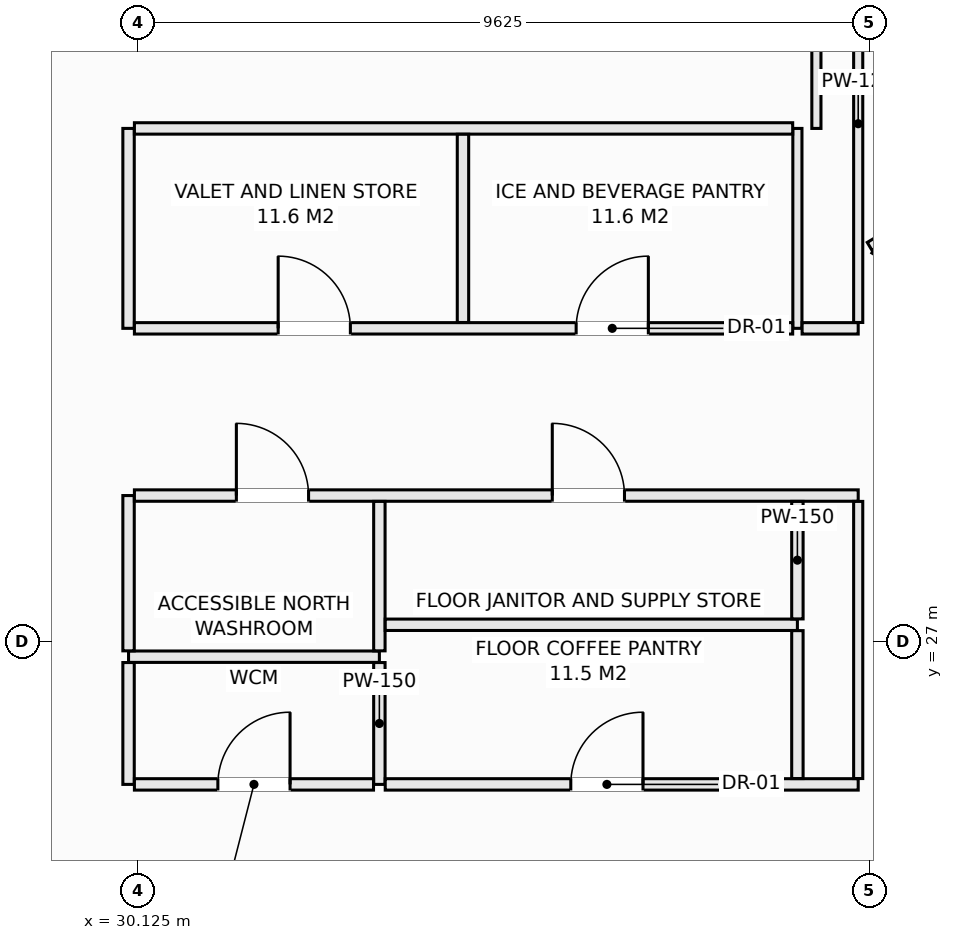
"""IFC4 building model, lengths in metres.
Left out: names, types, materials, properties, quantities, classifications, styles, units other than length and angle.
Written with IfcOpenShell. Run it as: python <this file> out.ifc"""

import sys

from ifc_helpers import new_model, si_unit, direction, frame, frame_2d, origin, place, context, subcontext, project, spatial, rectangle, extrude, element, fill, save


model = new_model("IFC4")
c1 = context("Model", 3, precision=1e-05, world=origin(), true_north=direction((0.0, 1.0)))
c2 = subcontext(c1, "Body", "Model", "MODEL_VIEW")
j1 = project(units=[si_unit("LENGTHUNIT", "METRE"), si_unit("PLANEANGLEUNIT", "RADIAN")], contexts=[c1])
p1 = place(None, origin())
s1 = spatial("IfcSite", under=j1, at=p1, CompositionType="ELEMENT")
p2 = place(p1, origin())
s2 = spatial("IfcBuilding", under=s1, at=p2, CompositionType="ELEMENT")
p3 = place(p2, frame((0.0, 0.0, 259.1)))
s3 = spatial("IfcBuildingStorey", under=s2, at=p3, CompositionType="ELEMENT", Elevation=259.1)
p4 = place(p3, frame((30.0, 26.8, 0.0), z_axis=(0.0, 0.0, 1.0), x_axis=(1.0, 0.0, 0.0)))
e1 = element("IfcWall", 1, at=p4, inside=s3, PredefinedType="PARTITIONING", context=c2, shape_type="SweptSolid", body=[
    extrude(rectangle(XDim=3.3, YDim=0.15, at=frame_2d((1.65, 0.0))), origin(), (0.0, 0.0, 1.0), 3.03),
])
p5 = place(p3, frame((30.0, 25.12, 0.0), z_axis=(0.0, 0.0, 1.0), x_axis=(0.0, 1.0, 0.0)))
e2 = element("IfcWall", 2, at=p5, inside=s3, PredefinedType="PARTITIONING", context=c2, shape_type="SweptSolid", body=[
    extrude(rectangle(XDim=1.603, YDim=0.15, at=frame_2d((0.801, 0.0))), origin(), (0.0, 0.0, 1.0), 3.03),
])
p6 = place(p3, frame((30.0, 26.877, 0.0), z_axis=(0.0, 0.0, 1.0), x_axis=(0.0, 1.0, 0.0)))
e3 = element("IfcWall", 3, at=p6, inside=s3, PredefinedType="PARTITIONING", context=c2, shape_type="SweptSolid", body=[
    extrude(rectangle(XDim=2.043, YDim=0.15, at=frame_2d((1.021, 0.0))), origin(), (0.0, 0.0, 1.0), 3.03),
])
p7 = place(p3, frame((30.0, 31.12, 0.0), z_axis=(0.0, 0.0, 1.0), x_axis=(0.0, 1.0, 0.0)))
e4 = element("IfcWall", 4, at=p7, inside=s3, PredefinedType="PARTITIONING", context=c2, shape_type="SweptSolid", body=[
    extrude(rectangle(XDim=2.63, YDim=0.15, at=frame_2d((1.315, 0.0))), origin(), (0.0, 0.0, 1.0), 3.03),
])
p8 = place(p3, frame((30.077, 28.92, 0.0), z_axis=(0.0, 0.0, 1.0), x_axis=(1.0, 0.0, 0.0)))
e5 = element("IfcWall", 5, at=p8, inside=s3, PredefinedType="PARTITIONING", context=c2, shape_type="SweptSolid", body=[
    extrude(rectangle(XDim=9.523, YDim=0.15, at=frame_2d((4.762, 0.0))), origin(), (0.0, 0.0, 1.0), 3.03),
])
p9 = place(p8, frame((1.342, 0.0, 0.0)))
e6 = element("IfcOpeningElement", 6, at=p9, cuts=e5, PredefinedType="OPENING", context=c2, shape_type="SweptSolid", body=[
    extrude(rectangle(XDim=0.95, YDim=2.1, at=frame_2d((0.475, 1.05))), frame((0.0, 0.085, 0.0), z_axis=(0.0, -1.0, 0.0), x_axis=(1.0, 0.0, 0.0)), (0.0, 0.0, 1.0), 0.17),
])
p10 = place(p8, frame((5.498, 0.0, 0.0)))
e7 = element("IfcOpeningElement", 7, at=p10, cuts=e5, PredefinedType="OPENING", context=c2, shape_type="SweptSolid", body=[
    extrude(rectangle(XDim=0.95, YDim=2.1, at=frame_2d((0.475, 1.05))), frame((0.0, 0.085, 0.0), z_axis=(0.0, -1.0, 0.0), x_axis=(1.0, 0.0, 0.0)), (0.0, 0.0, 1.0), 0.17),
])
p11 = place(p3, frame((33.3, 25.12, 0.0), z_axis=(0.0, 0.0, 1.0), x_axis=(0.0, 1.0, 0.0)))
e8 = element("IfcWall", 8, at=p11, inside=s3, PredefinedType="PARTITIONING", context=c2, shape_type="SweptSolid", body=[
    extrude(rectangle(XDim=1.603, YDim=0.15, at=frame_2d((0.801, 0.0))), origin(), (0.0, 0.0, 1.0), 3.03),
])
p12 = place(p3, frame((33.3, 26.877, 0.0), z_axis=(0.0, 0.0, 1.0), x_axis=(0.0, 1.0, 0.0)))
e9 = element("IfcWall", 9, at=p12, inside=s3, PredefinedType="PARTITIONING", context=c2, shape_type="SweptSolid", body=[
    extrude(rectangle(XDim=1.966, YDim=0.15, at=frame_2d((0.983, 0.0))), origin(), (0.0, 0.0, 1.0), 3.03),
])
p13 = place(p3, frame((30.077, 25.12, 0.0), z_axis=(0.0, 0.0, 1.0), x_axis=(1.0, 0.0, 0.0)))
e10 = element("IfcWall", 10, at=p13, inside=s3, PredefinedType="PARTITIONING", context=c2, shape_type="SweptSolid", body=[
    extrude(rectangle(XDim=3.146, YDim=0.15, at=frame_2d((1.573, 0.0))), origin(), (0.0, 0.0, 1.0), 3.03),
])
p14 = place(p13, frame((1.098, 0.0, 0.0)))
e11 = element("IfcOpeningElement", 11, at=p14, cuts=e10, PredefinedType="OPENING", context=c2, shape_type="SweptSolid", body=[
    extrude(rectangle(XDim=0.95, YDim=2.1, at=frame_2d((0.475, 1.05))), frame((0.0, 0.085, 0.0), z_axis=(0.0, -1.0, 0.0), x_axis=(1.0, 0.0, 0.0)), (0.0, 0.0, 1.0), 0.17),
])
p15 = place(p3, frame((33.377, 25.12, 0.0), z_axis=(0.0, 0.0, 1.0), x_axis=(1.0, 0.0, 0.0)))
e12 = element("IfcWall", 12, at=p15, inside=s3, PredefinedType="PARTITIONING", context=c2, shape_type="SweptSolid", body=[
    extrude(rectangle(XDim=6.223, YDim=0.15, at=frame_2d((3.112, 0.0))), origin(), (0.0, 0.0, 1.0), 3.03),
])
p16 = place(p15, frame((2.441, 0.0, 0.0)))
e13 = element("IfcOpeningElement", 13, at=p16, cuts=e12, PredefinedType="OPENING", context=c2, shape_type="SweptSolid", body=[
    extrude(rectangle(XDim=0.95, YDim=2.1, at=frame_2d((0.475, 1.05))), frame((0.0, 0.085, 0.0), z_axis=(0.0, -1.0, 0.0), x_axis=(1.0, 0.0, 0.0)), (0.0, 0.0, 1.0), 0.17),
])
p17 = place(p3, frame((33.377, 27.22, 0.0), z_axis=(0.0, 0.0, 1.0), x_axis=(1.0, 0.0, 0.0)))
e14 = element("IfcWall", 14, at=p17, inside=s3, PredefinedType="PARTITIONING", context=c2, shape_type="SweptSolid", body=[
    extrude(rectangle(XDim=5.423, YDim=0.15, at=frame_2d((2.711, 0.0))), origin(), (0.0, 0.0, 1.0), 3.03),
])
p18 = place(p3, frame((38.8, 25.197, 0.0), z_axis=(0.0, 0.0, 1.0), x_axis=(0.0, 1.0, 0.0)))
e15 = element("IfcWall", 15, at=p18, inside=s3, PredefinedType="PARTITIONING", context=c2, shape_type="SweptSolid", body=[
    extrude(rectangle(XDim=1.946, YDim=0.15, at=frame_2d((0.973, 0.0))), origin(), (0.0, 0.0, 1.0), 3.03),
])
p19 = place(p3, frame((38.8, 27.297, 0.0), z_axis=(0.0, 0.0, 1.0), x_axis=(0.0, 1.0, 0.0)))
e16 = element("IfcWall", 16, at=p19, inside=s3, PredefinedType="PARTITIONING", context=c2, shape_type="SweptSolid", body=[
    extrude(rectangle(XDim=1.546, YDim=0.15, at=frame_2d((0.773, 0.0))), origin(), (0.0, 0.0, 1.0), 3.03),
])
p20 = place(p3, frame((38.8, 31.12, 0.0), z_axis=(0.0, 0.0, 1.0), x_axis=(0.0, 1.0, 0.0)))
e17 = element("IfcWall", 17, at=p20, inside=s3, PredefinedType="PARTITIONING", context=c2, shape_type="SweptSolid", body=[
    extrude(rectangle(XDim=2.63, YDim=0.12, at=frame_2d((1.315, 0.0))), origin(), (0.0, 0.0, 1.0), 3.03),
])
p21 = place(p3, frame((30.077, 31.12, 0.0), z_axis=(0.0, 0.0, 1.0), x_axis=(1.0, 0.0, 0.0)))
e18 = element("IfcWall", 18, at=p21, inside=s3, PredefinedType="PARTITIONING", context=c2, shape_type="SweptSolid", body=[
    extrude(rectangle(XDim=8.661, YDim=0.15, at=frame_2d((4.331, 0.0))), origin(), (0.0, 0.0, 1.0), 3.03),
])
p22 = place(p21, frame((1.892, 0.0, 0.0)))
e19 = element("IfcOpeningElement", 19, at=p22, cuts=e18, PredefinedType="OPENING", context=c2, shape_type="SweptSolid", body=[
    extrude(rectangle(XDim=0.95, YDim=2.1, at=frame_2d((0.475, 1.05))), frame((0.0, 0.085, 0.0), z_axis=(0.0, -1.0, 0.0), x_axis=(1.0, 0.0, 0.0)), (0.0, 0.0, 1.0), 0.17),
])
p23 = place(p21, frame((5.812, 0.0, 0.0)))
e20 = element("IfcOpeningElement", 20, at=p23, cuts=e18, PredefinedType="OPENING", context=c2, shape_type="SweptSolid", body=[
    extrude(rectangle(XDim=0.95, YDim=2.1, at=frame_2d((0.475, 1.05))), frame((0.0, 0.085, 0.0), z_axis=(0.0, -1.0, 0.0), x_axis=(1.0, 0.0, 0.0)), (0.0, 0.0, 1.0), 0.17),
])
p24 = place(p3, frame((38.862, 31.12, 0.0), z_axis=(0.0, 0.0, 1.0), x_axis=(1.0, 0.0, 0.0)))
e21 = element("IfcWall", 21, at=p24, inside=s3, PredefinedType="PARTITIONING", context=c2, shape_type="SweptSolid", body=[
    extrude(rectangle(XDim=0.738, YDim=0.15, at=frame_2d((0.369, 0.0))), origin(), (0.0, 0.0, 1.0), 3.03),
])
p25 = place(p3, frame((30.077, 33.75, 0.0), z_axis=(0.0, 0.0, 1.0), x_axis=(1.0, 0.0, 0.0)))
e22 = element("IfcWall", 22, at=p25, inside=s3, PredefinedType="PARTITIONING", context=c2, shape_type="SweptSolid", body=[
    extrude(rectangle(XDim=8.661, YDim=0.15, at=frame_2d((4.331, 0.0))), origin(), (0.0, 0.0, 1.0), 3.03),
])
p26 = place(p3, frame((34.4, 31.197, 0.0), z_axis=(0.0, 0.0, 1.0), x_axis=(0.0, 1.0, 0.0)))
e23 = element("IfcWall", 23, at=p26, inside=s3, PredefinedType="PARTITIONING", context=c2, shape_type="SweptSolid", body=[
    extrude(rectangle(XDim=2.476, YDim=0.15, at=frame_2d((1.238, 0.0))), origin(), (0.0, 0.0, 1.0), 3.03),
])
p27 = place(p3, frame((39.05, 33.75, 0.0), z_axis=(0.0, 0.0, 1.0), x_axis=(0.0, 1.0, 0.0)))
e24 = element("IfcWall", 24, at=p27, inside=s3, PredefinedType="PARTITIONING", context=c2, shape_type="SweptSolid", body=[
    extrude(rectangle(XDim=1.938, YDim=0.12, at=frame_2d((0.969, 0.0))), origin(), (0.0, 0.0, 1.0), 3.03),
])
p28 = place(p3, frame((39.6, 25.197, 0.0), z_axis=(0.0, 0.0, 1.0), x_axis=(0.0, 1.0, 0.0)))
e25 = element("IfcWall", 25, at=p28, inside=s3, PredefinedType="PARTITIONING", context=c2, shape_type="SweptSolid", body=[
    extrude(rectangle(XDim=3.646, YDim=0.12, at=frame_2d((1.823, 0.0))), origin(), (0.0, 0.0, 1.0), 3.03),
])
p29 = place(p3, frame((39.6, 31.197, 0.0), z_axis=(0.0, 0.0, 1.0), x_axis=(0.0, 1.0, 0.0)))
e26 = element("IfcWall", 26, at=p29, inside=s3, PredefinedType="PARTITIONING", context=c2, shape_type="SweptSolid", body=[
    extrude(rectangle(XDim=5.23, YDim=0.12, at=frame_2d((2.615, 0.0))), origin(), (0.0, 0.0, 1.0), 3.03),
])
p30 = place(p3, frame((39.662, 36.348, 0.0), z_axis=(0.0, 0.0, 1.0), x_axis=(0.616212345115, -0.78758005671, 0.0)))
e27 = element("IfcWall", 27, at=p30, inside=s3, PredefinedType="PARTITIONING", context=c2, shape_type="SweptSolid", body=[
    extrude(rectangle(XDim=2.333, YDim=0.12, at=frame_2d((1.167, 0.0))), origin(), (0.0, 0.0, 1.0), 3.03),
])
p31 = place(p3, frame((39.75, 32.199, 0.0), z_axis=(0.0, 0.0, 1.0), x_axis=(0.857702120906, 0.514146935996, 0.0)))
e28 = element("IfcWall", 28, at=p31, inside=s3, PredefinedType="PARTITIONING", context=c2, shape_type="SweptSolid", body=[
    extrude(rectangle(XDim=1.441, YDim=0.12, at=frame_2d((0.721, 0.0))), origin(), (0.0, 0.0, 1.0), 3.03),
])
p32 = place(p3, frame((39.81, 32.163, 0.0), z_axis=(0.0, 0.0, 1.0), x_axis=(0.858011245414, -0.513630901273, 0.0)))
e29 = element("IfcWall", 29, at=p32, inside=s3, PredefinedType="PARTITIONING", context=c2, shape_type="SweptSolid", body=[
    extrude(rectangle(XDim=1.37, YDim=0.12, at=frame_2d((0.685, 0.0))), origin(), (0.0, 0.0, 1.0), 3.03),
])
p33 = place(p9, origin())
e30 = element("IfcDoor", 30, at=p33, inside=s3, OperationType="SINGLE_SWING_LEFT", PredefinedType="DOOR", context=c2, shape_type="SweptSolid", body=[
    extrude(rectangle(XDim=0.95, YDim=2.1, at=frame_2d((0.475, 1.05))), frame((0.0, 0.025, 0.0), z_axis=(0.0, -1.0, 0.0), x_axis=(1.0, 0.0, 0.0)), (0.0, 0.0, 1.0), 0.05),
])
fill(e6, e30)
p34 = place(p14, origin())
e31 = element("IfcDoor", 31, at=p34, inside=s3, OperationType="SINGLE_SWING_RIGHT", PredefinedType="DOOR", context=c2, shape_type="SweptSolid", body=[
    extrude(rectangle(XDim=0.95, YDim=2.1, at=frame_2d((0.475, 1.05))), frame((0.0, 0.025, 0.0), z_axis=(0.0, -1.0, 0.0), x_axis=(1.0, 0.0, 0.0)), (0.0, 0.0, 1.0), 0.05),
])
fill(e11, e31)
p35 = place(p10, origin())
e32 = element("IfcDoor", 32, at=p35, inside=s3, OperationType="SINGLE_SWING_LEFT", PredefinedType="DOOR", context=c2, shape_type="SweptSolid", body=[
    extrude(rectangle(XDim=0.95, YDim=2.1, at=frame_2d((0.475, 1.05))), frame((0.0, 0.025, 0.0), z_axis=(0.0, -1.0, 0.0), x_axis=(1.0, 0.0, 0.0)), (0.0, 0.0, 1.0), 0.05),
])
fill(e7, e32)
p36 = place(p16, origin())
e33 = element("IfcDoor", 33, at=p36, inside=s3, OperationType="SINGLE_SWING_RIGHT", PredefinedType="DOOR", context=c2, shape_type="SweptSolid", body=[
    extrude(rectangle(XDim=0.95, YDim=2.1, at=frame_2d((0.475, 1.05))), frame((0.0, 0.025, 0.0), z_axis=(0.0, -1.0, 0.0), x_axis=(1.0, 0.0, 0.0)), (0.0, 0.0, 1.0), 0.05),
])
fill(e13, e33)
p37 = place(p22, origin())
e34 = element("IfcDoor", 34, at=p37, inside=s3, OperationType="SINGLE_SWING_LEFT", PredefinedType="DOOR", context=c2, shape_type="SweptSolid", body=[
    extrude(rectangle(XDim=0.95, YDim=2.1, at=frame_2d((0.475, 1.05))), frame((0.0, 0.025, 0.0), z_axis=(0.0, -1.0, 0.0), x_axis=(1.0, 0.0, 0.0)), (0.0, 0.0, 1.0), 0.05),
])
fill(e19, e34)
p38 = place(p23, origin())
e35 = element("IfcDoor", 35, at=p38, inside=s3, OperationType="SINGLE_SWING_RIGHT", PredefinedType="DOOR", context=c2, shape_type="SweptSolid", body=[
    extrude(rectangle(XDim=0.95, YDim=2.1, at=frame_2d((0.475, 1.05))), frame((0.0, 0.025, 0.0), z_axis=(0.0, -1.0, 0.0), x_axis=(1.0, 0.0, 0.0)), (0.0, 0.0, 1.0), 0.05),
])
fill(e20, e35)
save(model, sys.argv[1])
